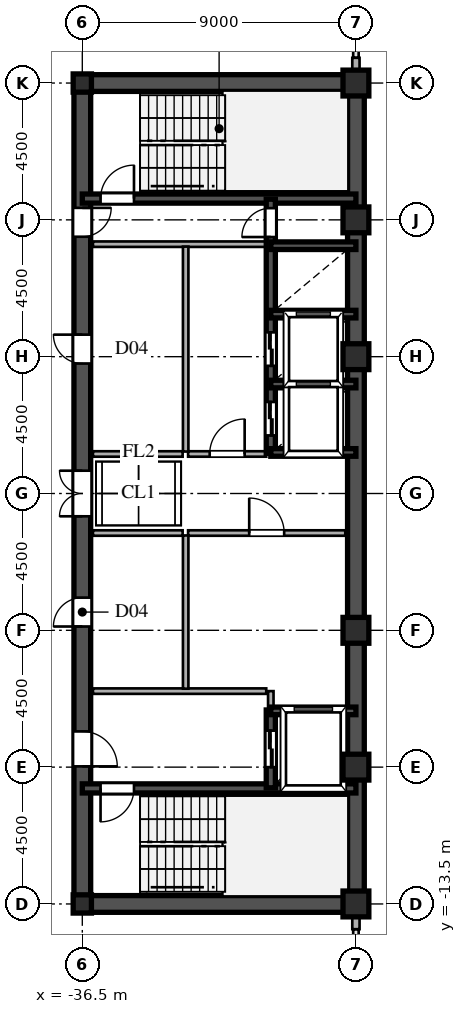
"""IFC4 building model, lengths in metres.
Left out: names, types, materials, properties, quantities, classifications, styles, units other than length and angle.
Written with IfcOpenShell. Run it as: python <this file> out.ifc"""

import sys

from ifc_helpers import new_model, si_unit, direction, frame, frame_2d, origin, origin_2d, place, context, subcontext, project, spatial, rectangle, hollow_rectangle, i_section, extrude, source, transform, mapped, element, fill, save


model = new_model("IFC4")
c1 = context("Model", 3, precision=1e-05, world=origin(), true_north=direction((0.0, 1.0)))
c2 = subcontext(c1, "Body", "Model", "MODEL_VIEW")
j1 = project(units=[si_unit("LENGTHUNIT", "METRE"), si_unit("PLANEANGLEUNIT", "RADIAN")], contexts=[c1])
p1 = place(None, origin())
s1 = spatial("IfcSite", under=j1, at=p1, CompositionType="ELEMENT")
p2 = place(p1, origin())
s2 = spatial("IfcBuilding", under=s1, at=p2, CompositionType="ELEMENT")
p3 = place(p2, frame((0.0, 0.0, 158.4)))
s3 = spatial("IfcBuildingStorey", under=s2, at=p3, CompositionType="ELEMENT", Elevation=158.4)
m1 = source(origin(), c2, "Body", "SweptSolid", [
    extrude(hollow_rectangle(XDim=0.85, YDim=0.85, WallThickness=0.036, at=origin_2d()), origin(), (0.0, 0.0, 1.0), 3.6),
])
for number, where, z_axis, x_axis in (
    (1, (-27.5, -13.5, 0.0), (0.0, 0.0, 1.0), (1.0, 0.0, 0.0)),
    (2, (-27.5, -9.0, 0.0), (0.0, 0.0, 1.0), (1.0, 0.0, 0.0)),
    (3, (-27.5, -4.5, 0.0), (0.0, 0.0, 1.0), (1.0, 0.0, 0.0)),
    (4, (-27.5, 4.5, 0.0), (0.0, 0.0, 1.0), (1.0, 0.0, 0.0)),
    (5, (-27.5, 9.0, 0.0), (0.0, 0.0, 1.0), (1.0, 0.0, 0.0)),
    (6, (-27.5, 13.5, 0.0), (0.0, 0.0, 1.0), (1.0, 0.0, 0.0)),
):
    element("IfcColumn", number, at=place(p3, frame(where, z_axis=z_axis, x_axis=x_axis)), inside=s3, PredefinedType="COLUMN", context=c2, shape_type="MappedRepresentation", body=[
        mapped(m1, transform((0.0, 0.0, 0.0), scale=1.0)),
    ])
m2 = source(origin(), c2, "Body", "SweptSolid", [
    extrude(i_section(OverallWidth=0.6, OverallDepth=0.6, WebThickness=0.025, FlangeThickness=0.04, at=origin_2d()), origin(), (0.0, 0.0, 1.0), 3.6),
])
for number, where, z_axis, x_axis in (
    (7, (-36.5, -13.5, 0.0), (0.0, 0.0, 1.0), (1.0, 0.0, 0.0)),
    (8, (-36.5, 13.5, 0.0), (0.0, 0.0, 1.0), (1.0, 0.0, 0.0)),
):
    element("IfcColumn", number, at=place(p3, frame(where, z_axis=z_axis, x_axis=x_axis)), inside=s3, PredefinedType="COLUMN", context=c2, shape_type="MappedRepresentation", body=[
        mapped(m2, transform((0.0, 0.0, 0.0), scale=1.0)),
    ])
for number, where, z_axis, x_axis in (
    (9, (-27.5, -14.33, 0.0), (0.0, 0.0, 1.0), (0.0, 1.0, 0.0)),
    (10, (-27.5, 13.78, 0.0), (0.0, 0.0, 1.0), (0.0, 1.0, 0.0)),
):
    element("IfcWall", number, at=place(p3, frame(where, z_axis=z_axis, x_axis=x_axis)), inside=s3, PredefinedType="SOLIDWALL", context=c2, shape_type="SweptSolid", body=[
        extrude(rectangle(XDim=0.55, YDim=0.24, at=frame_2d((0.275, 0.0))), origin(), (0.0, 0.0, 1.0), 2.84),
    ])
for number, where, z_axis, x_axis in (
    (11, (-27.5, -13.5, 0.0), (0.0, 0.0, 1.0), (0.0, 1.0, 0.0)),
    (12, (-27.5, 1.3, 0.0), (0.0, 0.0, 1.0), (0.0, 1.0, 0.0)),
):
    element("IfcWall", number, at=place(p3, frame(where, z_axis=z_axis, x_axis=x_axis)), inside=s3, PredefinedType="SHEAR", context=c2, shape_type="SweptSolid", body=[
        extrude(rectangle(XDim=12.2, YDim=0.55, at=frame_2d((6.1, 0.0))), origin(), (0.0, 0.0, 1.0), 3.34),
    ])
p4 = place(p3, frame((-27.5, -1.3, 0.0), z_axis=(0.0, 0.0, 1.0), x_axis=(0.0, 1.0, 0.0)))
e13 = element("IfcWall", 13, at=p4, inside=s3, PredefinedType="SHEAR", context=c2, shape_type="SweptSolid", body=[
    extrude(rectangle(XDim=2.6, YDim=0.55, at=frame_2d((1.3, 0.0))), origin(), (0.0, 0.0, 1.0), 3.34),
])
for number, where, z_axis, x_axis in (
    (14, (-36.5, -13.5, 0.0), (0.0, 0.0, 1.0), (1.0, 0.0, 0.0)),
    (15, (-36.5, 13.5, 0.0), (0.0, 0.0, 1.0), (1.0, 0.0, 0.0)),
):
    element("IfcWall", number, at=place(p3, frame(where, z_axis=z_axis, x_axis=x_axis)), inside=s3, PredefinedType="SHEAR", context=c2, shape_type="SweptSolid", body=[
        extrude(rectangle(XDim=9.0, YDim=0.55, at=frame_2d((4.5, 0.0))), origin(), (0.0, 0.0, 1.0), 3.34),
    ])
p5 = place(p3, frame((-36.5, -13.65, 0.0), z_axis=(0.0, 0.0, 1.0), x_axis=(0.0, 1.0, 0.0)))
e16 = element("IfcWall", 16, at=p5, inside=s3, PredefinedType="SHEAR", context=c2, shape_type="SweptSolid", body=[
    extrude(rectangle(XDim=7.15, YDim=0.55, at=frame_2d((3.575, 0.0))), origin(), (0.0, 0.0, 1.0), 3.34),
])
p6 = place(p5, frame((4.675, 0.0, 0.0)))
e17 = element("IfcOpeningElement", 17, at=p6, cuts=e16, PredefinedType="OPENING", context=c2, shape_type="SweptSolid", body=[
    extrude(rectangle(XDim=1.15, YDim=2.2, at=frame_2d((0.575, 1.1))), frame((0.0, 0.285, 0.0), z_axis=(0.0, -1.0, 0.0), x_axis=(1.0, 0.0, 0.0)), (0.0, 0.0, 1.0), 0.57),
])
p7 = place(p3, frame((-36.5, -1.3, 0.0), z_axis=(0.0, 0.0, 1.0), x_axis=(0.0, 1.0, 0.0)))
e18 = element("IfcWall", 18, at=p7, inside=s3, PredefinedType="SHEAR", context=c2, shape_type="SweptSolid", body=[
    extrude(rectangle(XDim=2.6, YDim=0.55, at=frame_2d((1.3, 0.0))), origin(), (0.0, 0.0, 1.0), 3.34),
])
p8 = place(p7, frame((0.55, 0.0, 0.0)))
e19 = element("IfcOpeningElement", 19, at=p8, cuts=e18, PredefinedType="OPENING", context=c2, shape_type="SweptSolid", body=[
    extrude(rectangle(XDim=1.5, YDim=2.3, at=frame_2d((0.75, 1.15))), frame((0.0, 0.285, 0.0), z_axis=(0.0, -1.0, 0.0), x_axis=(1.0, 0.0, 0.0)), (0.0, 0.0, 1.0), 0.57),
])
p9 = place(p3, frame((-36.5, 8.2, 0.0), z_axis=(0.0, 0.0, 1.0), x_axis=(0.0, 1.0, 0.0)))
e20 = element("IfcWall", 20, at=p9, inside=s3, PredefinedType="SHEAR", context=c2, shape_type="SweptSolid", body=[
    extrude(rectangle(XDim=5.45, YDim=0.55, at=frame_2d((2.725, 0.0))), origin(), (0.0, 0.0, 1.0), 3.34),
])
p10 = place(p9, frame((0.245, 0.0, 0.0)))
e21 = element("IfcOpeningElement", 21, at=p10, cuts=e20, PredefinedType="OPENING", context=c2, shape_type="SweptSolid", body=[
    extrude(rectangle(XDim=0.95, YDim=2.15, at=frame_2d((0.475, 1.075))), frame((0.0, 0.285, 0.0), z_axis=(0.0, -1.0, 0.0), x_axis=(1.0, 0.0, 0.0)), (0.0, 0.0, 1.0), 0.57),
])
p11 = place(p3, frame((-36.5, -6.5, 0.0), z_axis=(0.0, 0.0, 1.0), x_axis=(0.0, 1.0, 0.0)))
e22 = element("IfcWall", 22, at=p11, inside=s3, PredefinedType="SHEAR", context=c2, shape_type="SweptSolid", body=[
    extrude(rectangle(XDim=5.2, YDim=0.55, at=frame_2d((2.6, 0.0))), origin(), (0.0, 0.0, 1.0), 3.34),
])
p12 = place(p11, frame((2.125, 0.0, 0.0)))
e23 = element("IfcOpeningElement", 23, at=p12, cuts=e22, PredefinedType="OPENING", context=c2, shape_type="SweptSolid", body=[
    extrude(rectangle(XDim=0.95, YDim=2.15, at=frame_2d((0.475, 1.075))), frame((0.0, 0.285, 0.0), z_axis=(0.0, -1.0, 0.0), x_axis=(1.0, 0.0, 0.0)), (0.0, 0.0, 1.0), 0.57),
])
p13 = place(p3, frame((-36.5, 1.3, 0.0), z_axis=(0.0, 0.0, 1.0), x_axis=(0.0, 1.0, 0.0)))
e24 = element("IfcWall", 24, at=p13, inside=s3, PredefinedType="SHEAR", context=c2, shape_type="SweptSolid", body=[
    extrude(rectangle(XDim=6.9, YDim=0.55, at=frame_2d((3.45, 0.0))), origin(), (0.0, 0.0, 1.0), 3.34),
])
p14 = place(p13, frame((2.975, 0.0, 0.0)))
e25 = element("IfcOpeningElement", 25, at=p14, cuts=e24, PredefinedType="OPENING", context=c2, shape_type="SweptSolid", body=[
    extrude(rectangle(XDim=0.95, YDim=2.15, at=frame_2d((0.475, 1.075))), frame((0.0, 0.285, 0.0), z_axis=(0.0, -1.0, 0.0), x_axis=(1.0, 0.0, 0.0)), (0.0, 0.0, 1.0), 0.57),
])
p15 = place(p3, frame((-36.5, -9.7, 0.0), z_axis=(0.0, 0.0, 1.0), x_axis=(1.0, 0.0, 0.0)))
e26 = element("IfcWall", 26, at=p15, inside=s3, PredefinedType="SHEAR", context=c2, shape_type="SweptSolid", body=[
    extrude(rectangle(XDim=9.0, YDim=0.3, at=frame_2d((4.5, 0.0))), origin(), (0.0, 0.0, 1.0), 3.34),
])
p16 = place(p15, frame((0.6, 0.0, 0.0)))
e27 = element("IfcOpeningElement", 27, at=p16, cuts=e26, PredefinedType="OPENING", context=c2, shape_type="SweptSolid", body=[
    extrude(rectangle(XDim=1.1, YDim=2.2, at=frame_2d((0.55, 1.1))), frame((0.0, 0.16, 0.0), z_axis=(0.0, -1.0, 0.0), x_axis=(1.0, 0.0, 0.0)), (0.0, 0.0, 1.0), 0.32),
])
p17 = place(p3, frame((-36.5, 9.7, 0.0), z_axis=(0.0, 0.0, 1.0), x_axis=(1.0, 0.0, 0.0)))
e28 = element("IfcWall", 28, at=p17, inside=s3, PredefinedType="SHEAR", context=c2, shape_type="SweptSolid", body=[
    extrude(rectangle(XDim=9.0, YDim=0.3, at=frame_2d((4.5, 0.0))), origin(), (0.0, 0.0, 1.0), 3.34),
])
p18 = place(p17, frame((0.6, 0.0, 0.0)))
e29 = element("IfcOpeningElement", 29, at=p18, cuts=e28, PredefinedType="OPENING", context=c2, shape_type="SweptSolid", body=[
    extrude(rectangle(XDim=1.1, YDim=2.2, at=frame_2d((0.55, 1.1))), frame((0.0, 0.16, 0.0), z_axis=(0.0, -1.0, 0.0), x_axis=(1.0, 0.0, 0.0)), (0.0, 0.0, 1.0), 0.32),
])
for number, where, z_axis, x_axis in (
    (30, (-30.3, -7.15, 0.0), (0.0, 0.0, 1.0), (1.0, 0.0, 0.0)),
    (31, (-30.3, 1.35, 0.0), (0.0, 0.0, 1.0), (1.0, 0.0, 0.0)),
    (32, (-30.3, 3.6, 0.0), (0.0, 0.0, 1.0), (1.0, 0.0, 0.0)),
    (33, (-30.3, 5.9, 0.0), (0.0, 0.0, 1.0), (1.0, 0.0, 0.0)),
    (34, (-30.3, 8.15, 0.0), (0.0, 0.0, 1.0), (1.0, 0.0, 0.0)),
):
    element("IfcWall", number, at=place(p3, frame(where, z_axis=z_axis, x_axis=x_axis)), inside=s3, PredefinedType="SHEAR", context=c2, shape_type="SweptSolid", body=[
        extrude(rectangle(XDim=2.8, YDim=0.25, at=frame_2d((1.4, 0.0))), origin(), (0.0, 0.0, 1.0), 3.34),
    ])
p19 = place(p3, frame((-30.3, -9.68, 0.0), z_axis=(0.0, 0.0, 1.0), x_axis=(0.0, 1.0, 0.0)))
e35 = element("IfcWall", 35, at=p19, inside=s3, PredefinedType="SHEAR", context=c2, shape_type="SweptSolid", body=[
    extrude(rectangle(XDim=2.56, YDim=0.3, at=frame_2d((1.28, 0.0))), origin(), (0.0, 0.0, 1.0), 3.34),
])
p20 = place(p19, frame((0.68, 0.0, 0.0)))
e36 = element("IfcOpeningElement", 36, at=p20, cuts=e35, PredefinedType="OPENING", context=c2, shape_type="SweptSolid", body=[
    extrude(rectangle(XDim=1.2, YDim=2.25, at=frame_2d((0.6, 1.125))), frame((0.0, 0.16, 0.0), z_axis=(0.0, -1.0, 0.0), x_axis=(1.0, 0.0, 0.0)), (0.0, 0.0, 1.0), 0.32),
])
p21 = place(p3, frame((-30.3, 1.32, 0.0), z_axis=(0.0, 0.0, 1.0), x_axis=(0.0, 1.0, 0.0)))
e37 = element("IfcWall", 37, at=p21, inside=s3, PredefinedType="SHEAR", context=c2, shape_type="SweptSolid", body=[
    extrude(rectangle(XDim=2.28, YDim=0.3, at=frame_2d((1.14, 0.0))), origin(), (0.0, 0.0, 1.0), 3.34),
])
p22 = place(p21, frame((0.59, 0.0, 0.0)))
e38 = element("IfcOpeningElement", 38, at=p22, cuts=e37, PredefinedType="OPENING", context=c2, shape_type="SweptSolid", body=[
    extrude(rectangle(XDim=1.1, YDim=2.2, at=frame_2d((0.55, 1.1))), frame((0.0, 0.16, 0.0), z_axis=(0.0, -1.0, 0.0), x_axis=(1.0, 0.0, 0.0)), (0.0, 0.0, 1.0), 0.32),
])
p23 = place(p3, frame((-30.3, 3.6, 0.0), z_axis=(0.0, 0.0, 1.0), x_axis=(0.0, 1.0, 0.0)))
e39 = element("IfcWall", 39, at=p23, inside=s3, PredefinedType="SHEAR", context=c2, shape_type="SweptSolid", body=[
    extrude(rectangle(XDim=2.3, YDim=0.3, at=frame_2d((1.15, 0.0))), origin(), (0.0, 0.0, 1.0), 3.34),
])
p24 = place(p23, frame((0.6, 0.0, 0.0)))
e40 = element("IfcOpeningElement", 40, at=p24, cuts=e39, PredefinedType="OPENING", context=c2, shape_type="SweptSolid", body=[
    extrude(rectangle(XDim=1.1, YDim=2.2, at=frame_2d((0.55, 1.1))), frame((0.0, 0.16, 0.0), z_axis=(0.0, -1.0, 0.0), x_axis=(1.0, 0.0, 0.0)), (0.0, 0.0, 1.0), 0.32),
])
p25 = place(p3, frame((-30.3, 5.9, 0.0), z_axis=(0.0, 0.0, 1.0), x_axis=(0.0, 1.0, 0.0)))
e41 = element("IfcWall", 41, at=p25, inside=s3, PredefinedType="SHEAR", context=c2, shape_type="SweptSolid", body=[
    extrude(rectangle(XDim=2.25, YDim=0.3, at=frame_2d((1.125, 0.0))), origin(), (0.0, 0.0, 1.0), 3.34),
])
p26 = place(p3, frame((-30.3, 8.15, 0.0), z_axis=(0.0, 0.0, 1.0), x_axis=(0.0, 1.0, 0.0)))
e42 = element("IfcWall", 42, at=p26, inside=s3, PredefinedType="SHEAR", context=c2, shape_type="SweptSolid", body=[
    extrude(rectangle(XDim=1.53, YDim=0.3, at=frame_2d((0.765, 0.0))), origin(), (0.0, 0.0, 1.0), 3.34),
])
p27 = place(p26, frame((0.285, 0.0, 0.0)))
e43 = element("IfcOpeningElement", 43, at=p27, cuts=e42, PredefinedType="OPENING", context=c2, shape_type="SweptSolid", body=[
    extrude(rectangle(XDim=0.95, YDim=2.15, at=frame_2d((0.475, 1.075))), frame((0.0, 0.16, 0.0), z_axis=(0.0, -1.0, 0.0), x_axis=(1.0, 0.0, 0.0)), (0.0, 0.0, 1.0), 0.32),
])
p28 = place(p3, frame((-36.15, -6.5, 0.0), z_axis=(0.0, 0.0, 1.0), x_axis=(1.0, 0.0, 0.0)))
e44 = element("IfcWall", 44, at=p28, inside=s3, PredefinedType="PARTITIONING", context=c2, shape_type="SweptSolid", body=[
    extrude(rectangle(XDim=5.7, YDim=0.18, at=frame_2d((2.85, 0.0))), origin(), (0.0, 0.0, 1.0), 3.34),
])
p29 = place(p3, frame((-30.3, -7.12, 0.0), z_axis=(0.0, 0.0, 1.0), x_axis=(0.0, 1.0, 0.0)))
e45 = element("IfcWall", 45, at=p29, inside=s3, PredefinedType="PARTITIONING", context=c2, shape_type="SweptSolid", body=[
    extrude(rectangle(XDim=0.62, YDim=0.18, at=frame_2d((0.31, 0.0))), origin(), (0.0, 0.0, 1.0), 3.34),
])
p30 = place(p3, frame((-36.15, 8.2, 0.0), z_axis=(0.0, 0.0, 1.0), x_axis=(1.0, 0.0, 0.0)))
e46 = element("IfcWall", 46, at=p30, inside=s3, PredefinedType="PARTITIONING", context=c2, shape_type="SweptSolid", body=[
    extrude(rectangle(XDim=5.7, YDim=0.18, at=frame_2d((2.85, 0.0))), origin(), (0.0, 0.0, 1.0), 3.34),
])
p31 = place(p3, frame((-33.1, -6.42, 0.0), z_axis=(0.0, 0.0, 1.0), x_axis=(0.0, 1.0, 0.0)))
e47 = element("IfcWall", 47, at=p31, inside=s3, PredefinedType="PARTITIONING", context=c2, shape_type="SweptSolid", body=[
    extrude(rectangle(XDim=5.04, YDim=0.18, at=frame_2d((2.52, 0.0))), origin(), (0.0, 0.0, 1.0), 3.34),
])
p32 = place(p3, frame((-33.1, 1.38, 0.0), z_axis=(0.0, 0.0, 1.0), x_axis=(0.0, 1.0, 0.0)))
e48 = element("IfcWall", 48, at=p32, inside=s3, PredefinedType="PARTITIONING", context=c2, shape_type="SweptSolid", body=[
    extrude(rectangle(XDim=6.74, YDim=0.18, at=frame_2d((3.37, 0.0))), origin(), (0.0, 0.0, 1.0), 3.34),
])
p33 = place(p3, frame((-33.02, -1.3, 0.0), z_axis=(0.0, 0.0, 1.0), x_axis=(1.0, 0.0, 0.0)))
e49 = element("IfcWall", 49, at=p33, inside=s3, PredefinedType="PARTITIONING", context=c2, shape_type="SweptSolid", body=[
    extrude(rectangle(XDim=5.17, YDim=0.18, at=frame_2d((2.585, 0.0))), origin(), (0.0, 0.0, 1.0), 3.34),
])
p34 = place(p33, frame((2.01, 0.0, 0.0)))
e50 = element("IfcOpeningElement", 50, at=p34, cuts=e49, PredefinedType="OPENING", context=c2, shape_type="SweptSolid", body=[
    extrude(rectangle(XDim=1.15, YDim=2.2, at=frame_2d((0.575, 1.1))), frame((0.0, 0.1, 0.0), z_axis=(0.0, -1.0, 0.0), x_axis=(1.0, 0.0, 0.0)), (0.0, 0.0, 1.0), 0.2),
])
p35 = place(p3, frame((-33.02, 1.3, 0.0), z_axis=(0.0, 0.0, 1.0), x_axis=(1.0, 0.0, 0.0)))
e51 = element("IfcWall", 51, at=p35, inside=s3, PredefinedType="PARTITIONING", context=c2, shape_type="SweptSolid", body=[
    extrude(rectangle(XDim=2.57, YDim=0.18, at=frame_2d((1.285, 0.0))), origin(), (0.0, 0.0, 1.0), 3.34),
])
p36 = place(p35, frame((0.71, 0.0, 0.0)))
e52 = element("IfcOpeningElement", 52, at=p36, cuts=e51, PredefinedType="OPENING", context=c2, shape_type="SweptSolid", body=[
    extrude(rectangle(XDim=1.15, YDim=2.2, at=frame_2d((0.575, 1.1))), frame((0.0, 0.1, 0.0), z_axis=(0.0, -1.0, 0.0), x_axis=(1.0, 0.0, 0.0)), (0.0, 0.0, 1.0), 0.2),
])
for number, where, z_axis, x_axis in (
    (53, (-36.15, -1.3, 0.0), (0.0, 0.0, 1.0), (1.0, 0.0, 0.0)),
    (54, (-36.15, 1.3, 0.0), (0.0, 0.0, 1.0), (1.0, 0.0, 0.0)),
):
    element("IfcWall", number, at=place(p3, frame(where, z_axis=z_axis, x_axis=x_axis)), inside=s3, PredefinedType="PARTITIONING", context=c2, shape_type="SweptSolid", body=[
        extrude(rectangle(XDim=2.95, YDim=0.18, at=frame_2d((1.475, 0.0))), origin(), (0.0, 0.0, 1.0), 3.34),
    ])
m3 = source(origin(), c2, "Body", "SweptSolid", [
    extrude(rectangle(XDim=1.15, YDim=2.2, at=frame_2d((0.575, 1.1))), frame((0.0, 0.025, 0.0), z_axis=(0.0, -1.0, 0.0), x_axis=(1.0, 0.0, 0.0)), (0.0, 0.0, 1.0), 0.05),
])
p37 = place(p6, frame((1.15, 0.0, 0.0), z_axis=(0.0, 0.0, 1.0), x_axis=(-1.0, 0.0, 0.0)))
e55 = element("IfcDoor", 55, at=p37, inside=s3, OperationType="SINGLE_SWING_LEFT", PredefinedType="DOOR", context=c2, shape_type="MappedRepresentation", body=[
    mapped(m3, transform((0.0, 0.0, 0.0), scale=1.0)),
])
fill(e17, e55)
m4 = source(origin(), c2, "Body", "SweptSolid", [
    extrude(rectangle(XDim=1.5, YDim=2.3, at=frame_2d((0.75, 1.15))), frame((0.0, 0.025, 0.0), z_axis=(0.0, -1.0, 0.0), x_axis=(1.0, 0.0, 0.0)), (0.0, 0.0, 1.0), 0.05),
])
p38 = place(p8, origin())
e56 = element("IfcDoor", 56, at=p38, inside=s3, OperationType="DOUBLE_SWING_LEFT", PredefinedType="DOOR", context=c2, shape_type="MappedRepresentation", body=[
    mapped(m4, transform((0.0, 0.0, 0.0), scale=1.0)),
])
fill(e19, e56)
m5 = source(origin(), c2, "Body", "SweptSolid", [
    extrude(rectangle(XDim=0.95, YDim=2.15, at=frame_2d((0.475, 1.075))), frame((0.0, 0.025, 0.0), z_axis=(0.0, -1.0, 0.0), x_axis=(1.0, 0.0, 0.0)), (0.0, 0.0, 1.0), 0.05),
])
p39 = place(p10, frame((0.95, 0.0, 0.0), z_axis=(0.0, 0.0, 1.0), x_axis=(-1.0, 0.0, 0.0)))
e57 = element("IfcDoor", 57, at=p39, inside=s3, OperationType="SINGLE_SWING_RIGHT", PredefinedType="DOOR", context=c2, shape_type="MappedRepresentation", body=[
    mapped(m5, transform((0.0, 0.0, 0.0), scale=1.0)),
])
fill(e21, e57)
p40 = place(p12, origin())
e58 = element("IfcDoor", 58, at=p40, inside=s3, OperationType="SINGLE_SWING_LEFT", PredefinedType="DOOR", context=c2, shape_type="MappedRepresentation", body=[
    mapped(m5, transform((0.0, 0.0, 0.0), scale=1.0)),
])
fill(e23, e58)
p41 = place(p14, origin())
e59 = element("IfcDoor", 59, at=p41, inside=s3, OperationType="SINGLE_SWING_RIGHT", PredefinedType="DOOR", context=c2, shape_type="MappedRepresentation", body=[
    mapped(m5, transform((0.0, 0.0, 0.0), scale=1.0)),
])
fill(e25, e59)
m6 = source(origin(), c2, "Body", "SweptSolid", [
    extrude(rectangle(XDim=1.1, YDim=2.2, at=frame_2d((0.55, 1.1))), frame((0.0, 0.025, 0.0), z_axis=(0.0, -1.0, 0.0), x_axis=(1.0, 0.0, 0.0)), (0.0, 0.0, 1.0), 0.05),
])
p42 = place(p16, frame((1.1, 0.0, 0.0), z_axis=(0.0, 0.0, 1.0), x_axis=(-1.0, 0.0, 0.0)))
e60 = element("IfcDoor", 60, at=p42, inside=s3, OperationType="SINGLE_SWING_LEFT", PredefinedType="DOOR", context=c2, shape_type="MappedRepresentation", body=[
    mapped(m6, transform((0.0, 0.0, 0.0), scale=1.0)),
])
fill(e27, e60)
p43 = place(p18, origin())
e61 = element("IfcDoor", 61, at=p43, inside=s3, OperationType="SINGLE_SWING_RIGHT", PredefinedType="DOOR", context=c2, shape_type="MappedRepresentation", body=[
    mapped(m6, transform((0.0, 0.0, 0.0), scale=1.0)),
])
fill(e29, e61)
m7 = source(origin(), c2, "Body", "SweptSolid", [
    extrude(rectangle(XDim=1.2, YDim=2.25, at=frame_2d((0.6, 1.125))), frame((0.0, 0.025, 0.0), z_axis=(0.0, -1.0, 0.0), x_axis=(1.0, 0.0, 0.0)), (0.0, 0.0, 1.0), 0.05),
])
p44 = place(p20, origin())
e62 = element("IfcDoor", 62, at=p44, inside=s3, OperationType="DOUBLE_DOOR_SLIDING", PredefinedType="DOOR", context=c2, shape_type="MappedRepresentation", body=[
    mapped(m7, transform((0.0, 0.0, 0.0), scale=1.0)),
])
fill(e36, e62)
m8 = source(origin(), c2, "Body", "SweptSolid", [
    extrude(rectangle(XDim=1.1, YDim=2.2, at=frame_2d((0.55, 1.1))), frame((0.0, 0.025, 0.0), z_axis=(0.0, -1.0, 0.0), x_axis=(1.0, 0.0, 0.0)), (0.0, 0.0, 1.0), 0.05),
])
p45 = place(p22, origin())
e63 = element("IfcDoor", 63, at=p45, inside=s3, OperationType="DOUBLE_DOOR_SLIDING", PredefinedType="DOOR", context=c2, shape_type="MappedRepresentation", body=[
    mapped(m8, transform((0.0, 0.0, 0.0), scale=1.0)),
])
fill(e38, e63)
p46 = place(p24, origin())
e64 = element("IfcDoor", 64, at=p46, inside=s3, OperationType="DOUBLE_DOOR_SLIDING", PredefinedType="DOOR", context=c2, shape_type="MappedRepresentation", body=[
    mapped(m8, transform((0.0, 0.0, 0.0), scale=1.0)),
])
fill(e40, e64)
p47 = place(p27, origin())
e65 = element("IfcDoor", 65, at=p47, inside=s3, OperationType="SINGLE_SWING_LEFT", PredefinedType="DOOR", context=c2, shape_type="MappedRepresentation", body=[
    mapped(m5, transform((0.0, 0.0, 0.0), scale=1.0)),
])
fill(e43, e65)
p48 = place(p34, origin())
e66 = element("IfcDoor", 66, at=p48, inside=s3, OperationType="SINGLE_SWING_LEFT", PredefinedType="DOOR", context=c2, shape_type="MappedRepresentation", body=[
    mapped(m3, transform((0.0, 0.0, 0.0), scale=1.0)),
])
fill(e50, e66)
p49 = place(p36, origin())
e67 = element("IfcDoor", 67, at=p49, inside=s3, OperationType="SINGLE_SWING_RIGHT", PredefinedType="DOOR", context=c2, shape_type="MappedRepresentation", body=[
    mapped(m3, transform((0.0, 0.0, 0.0), scale=1.0)),
])
fill(e52, e67)
save(model, sys.argv[1])
